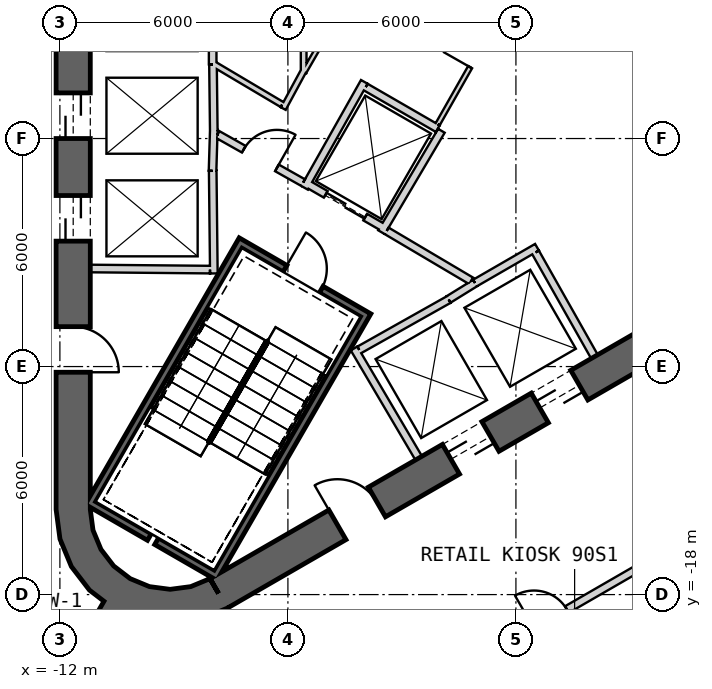
"""IFC4 building model, lengths in metres.
Left out: names, types, materials, properties, quantities, classifications, styles, units other than length and angle.
Written with IfcOpenShell. Run it as: python <this file> out.ifc"""

import sys

from ifc_helpers import new_model, si_unit, direction, frame, frame_2d, origin, place, context, subcontext, project, spatial, polyline, rectangle, outline, extrude, element, fill, save


model = new_model("IFC4")
c1 = context("Model", 3, precision=1e-05, world=origin(), true_north=direction((0.0, 1.0)))
c2 = subcontext(c1, "Body", "Model", "MODEL_VIEW")
j1 = project(units=[si_unit("LENGTHUNIT", "METRE"), si_unit("PLANEANGLEUNIT", "RADIAN")], contexts=[c1])
p1 = place(None, origin())
s1 = spatial("IfcSite", under=j1, at=p1, CompositionType="ELEMENT")
p2 = place(p1, origin())
s2 = spatial("IfcBuilding", under=s1, at=p2, CompositionType="ELEMENT")
p3 = place(p2, frame((0.0, 0.0, 392.3)))
s3 = spatial("IfcBuildingStorey", under=s2, at=p3, CompositionType="ELEMENT", Elevation=392.3)
p4 = place(p3, frame((-11.65, 15.762, 0.0), z_axis=(0.0, 0.0, 1.0), x_axis=(0.0, -1.0, 0.0)))
e1 = element("IfcWall", 1, at=p4, inside=s3, PredefinedType="SHEAR", context=c2, shape_type="SweptSolid", body=[
    extrude(rectangle(XDim=31.523, YDim=0.9, at=frame_2d((15.762, 0.0))), origin(), (0.0, 0.0, 1.0), 6.0),
])
p5 = place(p4, frame((7.062, 0.0, 0.0)))
e2 = element("IfcOpeningElement", 2, at=p5, cuts=e1, PredefinedType="OPENING", context=c2, shape_type="SweptSolid", body=[
    extrude(rectangle(XDim=1.2, YDim=2.4, at=frame_2d((0.6, 1.2))), frame((0.0, 0.46, 0.0), z_axis=(0.0, -1.0, 0.0), x_axis=(1.0, 0.0, 0.0)), (0.0, 0.0, 1.0), 0.92),
])
p6 = place(p4, frame((9.762, 0.0, 0.0)))
e3 = element("IfcOpeningElement", 3, at=p6, cuts=e1, PredefinedType="OPENING", context=c2, shape_type="SweptSolid", body=[
    extrude(rectangle(XDim=1.2, YDim=2.4, at=frame_2d((0.6, 1.2))), frame((0.0, 0.46, 0.0), z_axis=(0.0, -1.0, 0.0), x_axis=(1.0, 0.0, 0.0)), (0.0, 0.0, 1.0), 0.92),
])
p7 = place(p4, frame((12.462, 0.0, 0.0)))
e4 = element("IfcOpeningElement", 4, at=p7, cuts=e1, PredefinedType="OPENING", context=c2, shape_type="SweptSolid", body=[
    extrude(rectangle(XDim=1.2, YDim=2.4, at=frame_2d((0.6, 1.2))), frame((0.0, 0.46, 0.0), z_axis=(0.0, -1.0, 0.0), x_axis=(1.0, 0.0, 0.0)), (0.0, 0.0, 1.0), 0.92),
])
p8 = place(p4, frame((15.162, 0.0, 0.0)))
e5 = element("IfcOpeningElement", 5, at=p8, cuts=e1, PredefinedType="OPENING", context=c2, shape_type="SweptSolid", body=[
    extrude(rectangle(XDim=1.2, YDim=2.4, at=frame_2d((0.6, 1.2))), frame((0.0, 0.46, 0.0), z_axis=(0.0, -1.0, 0.0), x_axis=(1.0, 0.0, 0.0)), (0.0, 0.0, 1.0), 0.92),
])
p9 = place(p4, frame((17.862, 0.0, 0.0)))
e6 = element("IfcOpeningElement", 6, at=p9, cuts=e1, PredefinedType="OPENING", context=c2, shape_type="SweptSolid", body=[
    extrude(rectangle(XDim=1.2, YDim=2.4, at=frame_2d((0.6, 1.2))), frame((0.0, 0.46, 0.0), z_axis=(0.0, -1.0, 0.0), x_axis=(1.0, 0.0, 0.0)), (0.0, 0.0, 1.0), 0.92),
])
p10 = place(p4, frame((20.562, 0.0, 0.0)))
e7 = element("IfcOpeningElement", 7, at=p10, cuts=e1, PredefinedType="OPENING", context=c2, shape_type="SweptSolid", body=[
    extrude(rectangle(XDim=1.2, YDim=2.4, at=frame_2d((0.6, 1.2))), frame((0.0, 0.46, 0.0), z_axis=(0.0, -1.0, 0.0), x_axis=(1.0, 0.0, 0.0)), (0.0, 0.0, 1.0), 0.92),
])
p11 = place(p4, frame((23.262, 0.0, 0.0)))
e8 = element("IfcOpeningElement", 8, at=p11, cuts=e1, PredefinedType="OPENING", context=c2, shape_type="SweptSolid", body=[
    extrude(rectangle(XDim=1.2, YDim=2.4, at=frame_2d((0.6, 1.2))), frame((0.0, 0.46, 0.0), z_axis=(0.0, -1.0, 0.0), x_axis=(1.0, 0.0, 0.0)), (0.0, 0.0, 1.0), 0.92),
])
p12 = place(p4, frame((3.612, 0.0, 0.0)))
e9 = element("IfcOpeningElement", 9, at=p12, cuts=e1, PredefinedType="OPENING", context=c2, shape_type="SweptSolid", body=[
    extrude(rectangle(XDim=1.2, YDim=2.4, at=frame_2d((0.6, 1.2))), frame((0.0, 0.46, 0.0), z_axis=(0.0, -1.0, 0.0), x_axis=(1.0, 0.0, 0.0)), (0.0, 0.0, 1.0), 0.92),
])
p13 = place(p4, frame((26.712, 0.0, 0.0)))
e10 = element("IfcOpeningElement", 10, at=p13, cuts=e1, PredefinedType="OPENING", context=c2, shape_type="SweptSolid", body=[
    extrude(rectangle(XDim=1.2, YDim=2.4, at=frame_2d((0.6, 1.2))), frame((0.0, 0.46, 0.0), z_axis=(0.0, -1.0, 0.0), x_axis=(1.0, 0.0, 0.0)), (0.0, 0.0, 1.0), 0.92),
])
p14 = place(p3, frame((-7.825, -17.97, 0.0), z_axis=(0.0, 0.0, 1.0), x_axis=(0.866028369851, 0.499994862586, 0.0)))
e11 = element("IfcWall", 11, at=p14, inside=s3, PredefinedType="SHEAR", context=c2, shape_type="SweptSolid", body=[
    extrude(rectangle(XDim=31.523, YDim=0.9, at=frame_2d((15.762, 0.0))), origin(), (0.0, 0.0, 1.0), 6.0),
])
p15 = place(p14, frame((7.062, 0.0, 0.0)))
e12 = element("IfcOpeningElement", 12, at=p15, cuts=e11, PredefinedType="OPENING", context=c2, shape_type="SweptSolid", body=[
    extrude(rectangle(XDim=1.2, YDim=2.4, at=frame_2d((0.6, 1.2))), frame((0.0, 0.46, 0.0), z_axis=(0.0, -1.0, 0.0), x_axis=(1.0, 0.0, 0.0)), (0.0, 0.0, 1.0), 0.92),
])
p16 = place(p14, frame((9.762, 0.0, 0.0)))
e13 = element("IfcOpeningElement", 13, at=p16, cuts=e11, PredefinedType="OPENING", context=c2, shape_type="SweptSolid", body=[
    extrude(rectangle(XDim=1.2, YDim=2.4, at=frame_2d((0.6, 1.2))), frame((0.0, 0.46, 0.0), z_axis=(0.0, -1.0, 0.0), x_axis=(1.0, 0.0, 0.0)), (0.0, 0.0, 1.0), 0.92),
])
p17 = place(p14, frame((17.862, 0.0, 0.0)))
e14 = element("IfcOpeningElement", 14, at=p17, cuts=e11, PredefinedType="OPENING", context=c2, shape_type="SweptSolid", body=[
    extrude(rectangle(XDim=1.2, YDim=2.4, at=frame_2d((0.6, 1.2))), frame((0.0, 0.46, 0.0), z_axis=(0.0, -1.0, 0.0), x_axis=(1.0, 0.0, 0.0)), (0.0, 0.0, 1.0), 0.92),
])
p18 = place(p14, frame((20.562, 0.0, 0.0)))
e15 = element("IfcOpeningElement", 15, at=p18, cuts=e11, PredefinedType="OPENING", context=c2, shape_type="SweptSolid", body=[
    extrude(rectangle(XDim=1.2, YDim=2.4, at=frame_2d((0.6, 1.2))), frame((0.0, 0.46, 0.0), z_axis=(0.0, -1.0, 0.0), x_axis=(1.0, 0.0, 0.0)), (0.0, 0.0, 1.0), 0.92),
])
p19 = place(p14, frame((26.712, 0.0, 0.0)))
e16 = element("IfcOpeningElement", 16, at=p19, cuts=e11, PredefinedType="OPENING", context=c2, shape_type="SweptSolid", body=[
    extrude(rectangle(XDim=1.2, YDim=2.4, at=frame_2d((0.6, 1.2))), frame((0.0, 0.46, 0.0), z_axis=(0.0, -1.0, 0.0), x_axis=(1.0, 0.0, 0.0)), (0.0, 0.0, 1.0), 0.92),
])
p20 = place(p14, frame((3.612, 0.0, 0.0)))
e17 = element("IfcOpeningElement", 17, at=p20, cuts=e11, PredefinedType="OPENING", context=c2, shape_type="SweptSolid", body=[
    extrude(rectangle(XDim=1.2, YDim=2.4, at=frame_2d((0.6, 1.2))), frame((0.0, 0.46, 0.0), z_axis=(0.0, -1.0, 0.0), x_axis=(1.0, 0.0, 0.0)), (0.0, 0.0, 1.0), 0.92),
])
p21 = place(p3, origin())
e18 = element("IfcWall", 18, at=p21, inside=s3, PredefinedType="SHEAR", context=c2, shape_type="SweptSolid", body=[
    extrude(outline(polyline([(-12.1, -15.762), (-11.998, -16.538), (-11.698, -17.262), (-11.221, -17.883), (-10.6, -18.36), (-9.876, -18.659), (-9.1, -18.762), (-8.323, -18.659), (-7.6, -18.36), (-8.05, -17.58), (-8.556, -17.79), (-9.1, -17.862), (-9.644, -17.79), (-10.15, -17.58), (-10.585, -17.247), (-10.919, -16.812), (-11.128, -16.305), (-11.2, -15.762), (-12.1, -15.762)])), origin(), (0.0, 0.0, 1.0), 6.0),
])
p22 = place(p3, frame((-10.575, -18.316, 0.0), z_axis=(0.0, 0.0, 1.0), x_axis=(-0.500011655475, -0.866018674388, 0.0)))
e19 = element("IfcWall", 19, at=p22, inside=s3, PredefinedType="SHEAR", context=c2, shape_type="SweptSolid", body=[
    extrude(rectangle(XDim=6.455, YDim=0.6, at=frame_2d((3.228, 0.0))), origin(), (0.0, 0.0, 1.0), 6.0),
])
p23 = place(p22, frame((2.05, 0.0, 0.0)))
e20 = element("IfcOpeningElement", 20, at=p23, cuts=e19, PredefinedType="OPENING", context=c2, shape_type="SweptSolid", body=[
    extrude(rectangle(XDim=1.4, YDim=2.4, at=frame_2d((0.7, 1.2))), frame((0.0, 0.31, 0.0), z_axis=(0.0, -1.0, 0.0), x_axis=(1.0, 0.0, 0.0)), (0.0, 0.0, 1.0), 0.62),
])
p24 = place(p3, frame((-7.98, 4.05, 0.0), z_axis=(0.0, 0.0, 1.0), x_axis=(0.0, -1.0, 0.0)))
e21 = element("IfcWall", 21, at=p24, inside=s3, PredefinedType="PLUMBINGWALL", context=c2, shape_type="SweptSolid", body=[
    extrude(rectangle(XDim=8.1, YDim=0.2, at=frame_2d((4.05, 0.0))), origin(), (0.0, 0.0, 1.0), 5.7),
])
p25 = place(p3, frame((-7.95, -5.772, 0.0), z_axis=(0.0, 0.0, 1.0), x_axis=(-0.030803413295, -0.999525462272, 0.0)))
e22 = element("IfcWall", 22, at=p25, inside=s3, PredefinedType="PLUMBINGWALL", context=c2, shape_type="SweptSolid", body=[
    extrude(rectangle(XDim=1.078, YDim=0.2, at=frame_2d((0.539, 0.0))), origin(), (0.0, 0.0, 1.0), 5.7),
])
p26 = place(p3, frame((-7.971, -4.05, 0.0), z_axis=(0.0, 0.0, 1.0), x_axis=(0.012042535896, -0.999927486035, 0.0)))
e23 = element("IfcWall", 23, at=p26, inside=s3, PredefinedType="PLUMBINGWALL", context=c2, shape_type="SweptSolid", body=[
    extrude(rectangle(XDim=1.845, YDim=0.2, at=frame_2d((0.922, 0.0))), origin(), (0.0, 0.0, 1.0), 5.7),
])
p27 = place(p3, frame((-7.979, -6.85, 0.0), z_axis=(0.0, 0.0, 1.0), x_axis=(0.011121475088, -0.999938154483, 0.0)))
e24 = element("IfcWall", 24, at=p27, inside=s3, PredefinedType="PLUMBINGWALL", context=c2, shape_type="SweptSolid", body=[
    extrude(rectangle(XDim=2.7, YDim=0.2, at=frame_2d((1.35, 0.0))), origin(), (0.0, 0.0, 1.0), 5.7),
])
p28 = place(p3, frame((-8.05, -9.449, 0.0), z_axis=(0.0, 0.0, 1.0), x_axis=(-0.999957467379, 0.009222983926, 0.0)))
e25 = element("IfcWall", 25, at=p28, inside=s3, PredefinedType="PLUMBINGWALL", context=c2, shape_type="SweptSolid", body=[
    extrude(rectangle(XDim=3.15, YDim=0.2, at=frame_2d((1.575, 0.0))), origin(), (0.0, 0.0, 1.0), 5.7),
])
p29 = place(p3, frame((-2.558, -14.409, 0.0), z_axis=(0.0, 0.0, 1.0), x_axis=(-0.507997497166, 0.861358544901, 0.0)))
e26 = element("IfcWall", 26, at=p29, inside=s3, PredefinedType="PLUMBINGWALL", context=c2, shape_type="SweptSolid", body=[
    extrude(rectangle(XDim=3.35, YDim=0.2, at=frame_2d((1.675, 0.0))), origin(), (0.0, 0.0, 1.0), 5.7),
])
p30 = place(p3, frame((-1.769, -10.237, 0.0), z_axis=(0.0, 0.0, 1.0), x_axis=(-0.871534483978, -0.490334215854, 0.0)))
e27 = element("IfcWall", 27, at=p30, inside=s3, PredefinedType="PLUMBINGWALL", context=c2, shape_type="SweptSolid", body=[
    extrude(rectangle(XDim=2.7, YDim=0.2, at=frame_2d((1.35, 0.0))), origin(), (0.0, 0.0, 1.0), 5.7),
])
p31 = place(p3, frame((-1.076, -9.803, 0.0), z_axis=(0.0, 0.0, 1.0), x_axis=(-0.850341601995, -0.526231089842, 0.0)))
e28 = element("IfcWall", 28, at=p31, inside=s3, PredefinedType="PLUMBINGWALL", context=c2, shape_type="SweptSolid", body=[
    extrude(rectangle(XDim=0.817, YDim=0.2, at=frame_2d((0.408, 0.0))), origin(), (0.0, 0.0, 1.0), 5.7),
])
p32 = place(p3, frame((-1.077, -9.802, 0.0), z_axis=(0.0, 0.0, 1.0), x_axis=(0.865993522811, 0.500055215401, 0.0)))
e29 = element("IfcWall", 29, at=p32, inside=s3, PredefinedType="PLUMBINGWALL", context=c2, shape_type="SweptSolid", body=[
    extrude(rectangle(XDim=1.884, YDim=0.2, at=frame_2d((0.942, 0.0))), origin(), (0.0, 0.0, 1.0), 5.7),
])
p33 = place(p3, frame((0.517, -8.997, 0.0), z_axis=(0.0, 0.0, 1.0), x_axis=(0.491993409184, -0.87059892334, 0.0)))
e30 = element("IfcWall", 30, at=p33, inside=s3, PredefinedType="PLUMBINGWALL", context=c2, shape_type="SweptSolid", body=[
    extrude(rectangle(XDim=3.15, YDim=0.2, at=frame_2d((1.575, 0.0))), origin(), (0.0, 0.0, 1.0), 5.7),
])
p34 = place(p3, frame((-3.905, -10.563, -0.35), z_axis=(0.0, 0.0, 1.0), x_axis=(-0.500012932018, -0.866017937352, 0.0)))
e31 = element("IfcWall", 31, at=p34, inside=s3, PredefinedType="SHEAR", context=c2, shape_type="SweptSolid", body=[
    extrude(rectangle(XDim=8.1, YDim=0.2, at=frame_2d((4.05, 0.0))), origin(), (0.0, 0.0, 1.0), 6.05),
])
p35 = place(p3, frame((-11.282, -15.541, -0.35), z_axis=(0.0, 0.0, 1.0), x_axis=(0.866000578957, -0.500042995397, 0.0)))
e32 = element("IfcWall", 32, at=p35, inside=s3, PredefinedType="SHEAR", context=c2, shape_type="SweptSolid", body=[
    extrude(rectangle(XDim=1.89, YDim=0.2, at=frame_2d((0.945, 0.0))), origin(), (0.0, 0.0, 1.0), 6.05),
])
p36 = place(p3, frame((-9.455, -16.596, -0.35), z_axis=(0.0, 0.0, 1.0), x_axis=(0.866038843867, -0.499976720371, 0.0)))
e33 = element("IfcWall", 33, at=p36, inside=s3, PredefinedType="SHEAR", context=c2, shape_type="SweptSolid", body=[
    extrude(rectangle(XDim=1.69, YDim=0.2, at=frame_2d((0.845, 0.0))), origin(), (0.0, 0.0, 1.0), 6.05),
])
p37 = place(p3, frame((-7.196, -8.663, -0.35), z_axis=(0.0, 0.0, 1.0), x_axis=(-0.499997992926, -0.866026562566, 0.0)))
e34 = element("IfcWall", 34, at=p37, inside=s3, PredefinedType="SHEAR", context=c2, shape_type="SweptSolid", body=[
    extrude(rectangle(XDim=7.9, YDim=0.2, at=frame_2d((3.95, 0.0))), origin(), (0.0, 0.0, 1.0), 6.05),
])
p38 = place(p3, frame((-4.041, -10.599, -0.35), z_axis=(0.0, 0.0, 1.0), x_axis=(-0.866047807691, 0.499961193289, 0.0)))
e35 = element("IfcWall", 35, at=p38, inside=s3, PredefinedType="SHEAR", context=c2, shape_type="SweptSolid", body=[
    extrude(rectangle(XDim=3.6, YDim=0.2, at=frame_2d((1.8, 0.0))), origin(), (0.0, 0.0, 1.0), 6.05),
])
p39 = place(p38, frame((1.25, 0.0, 0.35)))
e36 = element("IfcOpeningElement", 36, at=p39, cuts=e35, PredefinedType="OPENING", context=c2, shape_type="SweptSolid", body=[
    extrude(rectangle(XDim=1.1, YDim=2.1, at=frame_2d((0.55, 1.05))), frame((0.0, 0.11, 0.0), z_axis=(0.0, -1.0, 0.0), x_axis=(1.0, 0.0, 0.0)), (0.0, 0.0, 1.0), 0.22),
])
p40 = place(p3, frame((-3.446, -8.368, 0.0), z_axis=(0.0, 0.0, 1.0), x_axis=(-0.866024647952, 0.500001309137, 0.0)))
e37 = element("IfcWall", 37, at=p40, inside=s3, PredefinedType="PLUMBINGWALL", context=c2, shape_type="SweptSolid", body=[
    extrude(rectangle(XDim=2.4, YDim=0.2, at=frame_2d((1.2, 0.0))), origin(), (0.0, 0.0, 1.0), 5.7),
])
p41 = place(p40, frame((0.6, 0.0, 0.0)))
e38 = element("IfcOpeningElement", 38, at=p41, cuts=e37, PredefinedType="OPENING", context=c2, shape_type="SweptSolid", body=[
    extrude(rectangle(XDim=1.2, YDim=2.4, at=frame_2d((0.6, 1.2))), frame((0.0, 0.11, 0.0), z_axis=(0.0, -1.0, 0.0), x_axis=(1.0, 0.0, 0.0)), (0.0, 0.0, 1.0), 0.22),
])
p42 = place(p3, frame((-1.961, -5.796, 0.0), z_axis=(0.0, 0.0, 1.0), x_axis=(-0.508647062354, -0.860975125052, 0.0)))
e39 = element("IfcWall", 39, at=p42, inside=s3, PredefinedType="PLUMBINGWALL", context=c2, shape_type="SweptSolid", body=[
    extrude(rectangle(XDim=3.1, YDim=0.2, at=frame_2d((1.55, 0.0))), origin(), (0.0, 0.0, 1.0), 5.7),
])
p43 = place(p3, frame((-3.99, -4.509, 0.0), z_axis=(0.0, 0.0, 1.0), x_axis=(-0.491358283181, -0.870957540612, 0.0)))
e40 = element("IfcWall", 40, at=p43, inside=s3, PredefinedType="PLUMBINGWALL", context=c2, shape_type="SweptSolid", body=[
    extrude(rectangle(XDim=3.2, YDim=0.2, at=frame_2d((1.6, 0.0))), origin(), (0.0, 0.0, 1.0), 5.7),
])
p44 = place(p3, frame((-3.953, -4.646, 0.0), z_axis=(0.0, 0.0, 1.0), x_axis=(0.866038900241, -0.499976622722, 0.0)))
e41 = element("IfcWall", 41, at=p44, inside=s3, PredefinedType="PLUMBINGWALL", context=c2, shape_type="SweptSolid", body=[
    extrude(rectangle(XDim=2.189, YDim=0.2, at=frame_2d((1.095, 0.0))), origin(), (0.0, 0.0, 1.0), 5.7),
])
p45 = place(p3, frame((-3.401, -8.43, 0.0), z_axis=(0.0, 0.0, 1.0), x_axis=(0.860630814782, -0.509229418482, 0.0)))
e42 = element("IfcWall", 42, at=p45, inside=s3, PredefinedType="PARTITIONING", context=c2, shape_type="SweptSolid", body=[
    extrude(rectangle(XDim=2.582, YDim=0.2, at=frame_2d((1.291, 0.0))), origin(), (0.0, 0.0, 1.0), 5.7),
])
p46 = place(p3, frame((-7.849, -5.894, 0.0), z_axis=(0.0, 0.0, 1.0), x_axis=(0.871363259478, -0.490638431059, 0.0)))
e43 = element("IfcWall", 43, at=p46, inside=s3, PredefinedType="PARTITIONING", context=c2, shape_type="SweptSolid", body=[
    extrude(rectangle(XDim=2.581, YDim=0.2, at=frame_2d((1.291, 0.0))), origin(), (0.0, 0.0, 1.0), 5.7),
])
p47 = place(p46, frame((0.791, 0.0, 0.0)))
e44 = element("IfcOpeningElement", 44, at=p47, cuts=e43, PredefinedType="OPENING", context=c2, shape_type="SweptSolid", body=[
    extrude(rectangle(XDim=1.0, YDim=2.1, at=frame_2d((0.5, 1.05))), frame((0.0, 0.11, 0.0), z_axis=(0.0, -1.0, 0.0), x_axis=(1.0, 0.0, 0.0)), (0.0, 0.0, 1.0), 0.22),
])
p48 = place(p3, frame((0.094, -1.836, 0.0), z_axis=(0.0, 0.0, 1.0), x_axis=(-0.494097972448, -0.869406230495, 0.0)))
e45 = element("IfcWall", 45, at=p48, inside=s3, PredefinedType="PARTITIONING", context=c2, shape_type="SweptSolid", body=[
    extrude(rectangle(XDim=4.357, YDim=0.12, at=frame_2d((2.179, 0.0))), origin(), (0.0, 0.0, 1.0), 5.7),
])
p49 = place(p48, frame((1.83, 0.0, 0.0)))
e46 = element("IfcOpeningElement", 46, at=p49, cuts=e45, PredefinedType="OPENING", context=c2, shape_type="SweptSolid", body=[
    extrude(rectangle(XDim=0.8, YDim=2.1, at=frame_2d((0.4, 1.05))), frame((0.0, 0.07, 0.0), z_axis=(0.0, -1.0, 0.0), x_axis=(1.0, 0.0, 0.0)), (0.0, 0.0, 1.0), 0.14),
])
p50 = place(p3, frame((-5.586, -4.275, 0.0), z_axis=(0.0, 0.0, 1.0), x_axis=(0.0, 1.0, 0.0)))
e47 = element("IfcWall", 47, at=p50, inside=s3, PredefinedType="PLUMBINGWALL", context=c2, shape_type="SweptSolid", body=[
    extrude(rectangle(XDim=8.549, YDim=0.15, at=frame_2d((4.275, 0.0))), origin(), (0.0, 0.0, 1.0), 5.7),
])
p51 = place(p3, frame((-6.124, -5.211, 0.0), z_axis=(0.0, 0.0, 1.0), x_axis=(0.476228984866, 0.879321303036, 0.0)))
e48 = element("IfcWall", 48, at=p51, inside=s3, PredefinedType="PLUMBINGWALL", context=c2, shape_type="SweptSolid", body=[
    extrude(rectangle(XDim=1.162, YDim=0.15, at=frame_2d((0.581, 0.0))), origin(), (0.0, 0.0, 1.0), 5.7),
])
p52 = place(p3, frame((-7.95, -4.041, 0.0), z_axis=(0.0, 0.0, 1.0), x_axis=(0.860090281069, -0.510141851263, 0.0)))
e49 = element("IfcWall", 49, at=p52, inside=s3, PredefinedType="PLUMBINGWALL", context=c2, shape_type="SweptSolid", body=[
    extrude(rectangle(XDim=2.089, YDim=0.15, at=frame_2d((1.045, 0.0))), origin(), (0.0, 0.0, 1.0), 5.7),
])
p53 = place(p3, frame((-5.571, -4.249, 0.0), z_axis=(0.0, 0.0, 1.0), x_axis=(0.500081145431, 0.865978549379, 0.0)))
e50 = element("IfcWall", 50, at=p53, inside=s3, PredefinedType="PARTITIONING", context=c2, shape_type="SweptSolid", body=[
    extrude(rectangle(XDim=1.905, YDim=0.12, at=frame_2d((0.953, 0.0))), origin(), (0.0, 0.0, 1.0), 5.7),
])
p54 = place(p3, frame((-6.192, -22.743, 0.0), z_axis=(0.0, 0.0, 1.0), x_axis=(0.86602812093, 0.499995293736, 0.0)))
e51 = element("IfcWall", 51, at=p54, inside=s3, PredefinedType="PARTITIONING", context=c2, shape_type="SweptSolid", body=[
    extrude(rectangle(XDim=16.369, YDim=0.2, at=frame_2d((8.185, 0.0))), origin(), (0.0, 0.0, 1.0), 5.07),
])
p55 = place(p54, frame((7.7, 0.0, 0.0)))
e52 = element("IfcOpeningElement", 52, at=p55, cuts=e51, PredefinedType="OPENING", context=c2, shape_type="SweptSolid", body=[
    extrude(rectangle(XDim=1.0, YDim=2.1, at=frame_2d((0.5, 1.05))), frame((0.0, 0.11, 0.0), z_axis=(0.0, -1.0, 0.0), x_axis=(1.0, 0.0, 0.0)), (0.0, 0.0, 1.0), 0.22),
])
p56 = place(p39, origin())
e53 = element("IfcDoor", 53, at=p56, inside=s3, OperationType="SINGLE_SWING_RIGHT", PredefinedType="USERDEFINED", context=c2, shape_type="SweptSolid", body=[
    extrude(rectangle(XDim=1.1, YDim=2.1, at=frame_2d((0.55, 1.05))), frame((0.0, 0.025, 0.0), z_axis=(0.0, -1.0, 0.0), x_axis=(1.0, 0.0, 0.0)), (0.0, 0.0, 1.0), 0.05),
])
fill(e36, e53)
p57 = place(p47, origin())
e54 = element("IfcDoor", 54, at=p57, inside=s3, OperationType="SINGLE_SWING_RIGHT", PredefinedType="USERDEFINED", context=c2, shape_type="SweptSolid", body=[
    extrude(rectangle(XDim=1.0, YDim=2.1, at=frame_2d((0.5, 1.05))), frame((0.0, 0.025, 0.0), z_axis=(0.0, -1.0, 0.0), x_axis=(1.0, 0.0, 0.0)), (0.0, 0.0, 1.0), 0.05),
])
fill(e44, e54)
p58 = place(p41, origin())
e55 = element("IfcDoor", 55, at=p58, inside=s3, OperationType="SLIDING_TO_LEFT", PredefinedType="USERDEFINED", context=c2, shape_type="SweptSolid", body=[
    extrude(rectangle(XDim=1.2, YDim=2.4, at=frame_2d((0.6, 1.2))), frame((0.0, 0.025, 0.0), z_axis=(0.0, -1.0, 0.0), x_axis=(1.0, 0.0, 0.0)), (0.0, 0.0, 1.0), 0.05),
])
fill(e38, e55)
p59 = place(p49, origin())
e56 = element("IfcDoor", 56, at=p59, inside=s3, OperationType="SINGLE_SWING_RIGHT", PredefinedType="USERDEFINED", context=c2, shape_type="SweptSolid", body=[
    extrude(rectangle(XDim=0.8, YDim=2.1, at=frame_2d((0.4, 1.05))), frame((0.0, 0.025, 0.0), z_axis=(0.0, -1.0, 0.0), x_axis=(1.0, 0.0, 0.0)), (0.0, 0.0, 1.0), 0.05),
])
fill(e46, e56)
p60 = place(p55, origin())
e57 = element("IfcDoor", 57, at=p60, inside=s3, OperationType="SINGLE_SWING_LEFT", PredefinedType="USERDEFINED", context=c2, shape_type="SweptSolid", body=[
    extrude(rectangle(XDim=1.0, YDim=2.1, at=frame_2d((0.5, 1.05))), frame((0.0, 0.025, 0.0), z_axis=(0.0, -1.0, 0.0), x_axis=(1.0, 0.0, 0.0)), (0.0, 0.0, 1.0), 0.05),
])
fill(e52, e57)
p61 = place(p10, origin())
e58 = element("IfcDoor", 58, at=p61, inside=s3, OperationType="SLIDING_TO_LEFT", PredefinedType="USERDEFINED", context=c2, shape_type="SweptSolid", body=[
    extrude(rectangle(XDim=1.2, YDim=2.4, at=frame_2d((0.6, 1.2))), frame((0.0, 0.025, 0.0), z_axis=(0.0, -1.0, 0.0), x_axis=(1.0, 0.0, 0.0)), (0.0, 0.0, 1.0), 0.05),
])
fill(e7, e58)
p62 = place(p11, origin())
e59 = element("IfcDoor", 59, at=p62, inside=s3, OperationType="SLIDING_TO_LEFT", PredefinedType="USERDEFINED", context=c2, shape_type="SweptSolid", body=[
    extrude(rectangle(XDim=1.2, YDim=2.4, at=frame_2d((0.6, 1.2))), frame((0.0, 0.025, 0.0), z_axis=(0.0, -1.0, 0.0), x_axis=(1.0, 0.0, 0.0)), (0.0, 0.0, 1.0), 0.05),
])
fill(e8, e59)
p63 = place(p15, origin())
e60 = element("IfcDoor", 60, at=p63, inside=s3, OperationType="SLIDING_TO_LEFT", PredefinedType="USERDEFINED", context=c2, shape_type="SweptSolid", body=[
    extrude(rectangle(XDim=1.2, YDim=2.4, at=frame_2d((0.6, 1.2))), frame((0.0, 0.025, 0.0), z_axis=(0.0, -1.0, 0.0), x_axis=(1.0, 0.0, 0.0)), (0.0, 0.0, 1.0), 0.05),
])
fill(e12, e60)
p64 = place(p16, origin())
e61 = element("IfcDoor", 61, at=p64, inside=s3, OperationType="SLIDING_TO_LEFT", PredefinedType="USERDEFINED", context=c2, shape_type="SweptSolid", body=[
    extrude(rectangle(XDim=1.2, YDim=2.4, at=frame_2d((0.6, 1.2))), frame((0.0, 0.025, 0.0), z_axis=(0.0, -1.0, 0.0), x_axis=(1.0, 0.0, 0.0)), (0.0, 0.0, 1.0), 0.05),
])
fill(e13, e61)
p65 = place(p13, origin())
e62 = element("IfcDoor", 62, at=p65, inside=s3, OperationType="SINGLE_SWING_RIGHT", PredefinedType="USERDEFINED", context=c2, shape_type="SweptSolid", body=[
    extrude(rectangle(XDim=1.2, YDim=2.4, at=frame_2d((0.6, 1.2))), frame((0.0, 0.025, 0.0), z_axis=(0.0, -1.0, 0.0), x_axis=(1.0, 0.0, 0.0)), (0.0, 0.0, 1.0), 0.05),
])
fill(e10, e62)
p66 = place(p20, origin())
e63 = element("IfcDoor", 63, at=p66, inside=s3, OperationType="SINGLE_SWING_LEFT", PredefinedType="USERDEFINED", context=c2, shape_type="SweptSolid", body=[
    extrude(rectangle(XDim=1.2, YDim=2.4, at=frame_2d((0.6, 1.2))), frame((0.0, 0.025, 0.0), z_axis=(0.0, -1.0, 0.0), x_axis=(1.0, 0.0, 0.0)), (0.0, 0.0, 1.0), 0.05),
])
fill(e17, e63)
save(model, sys.argv[1])
